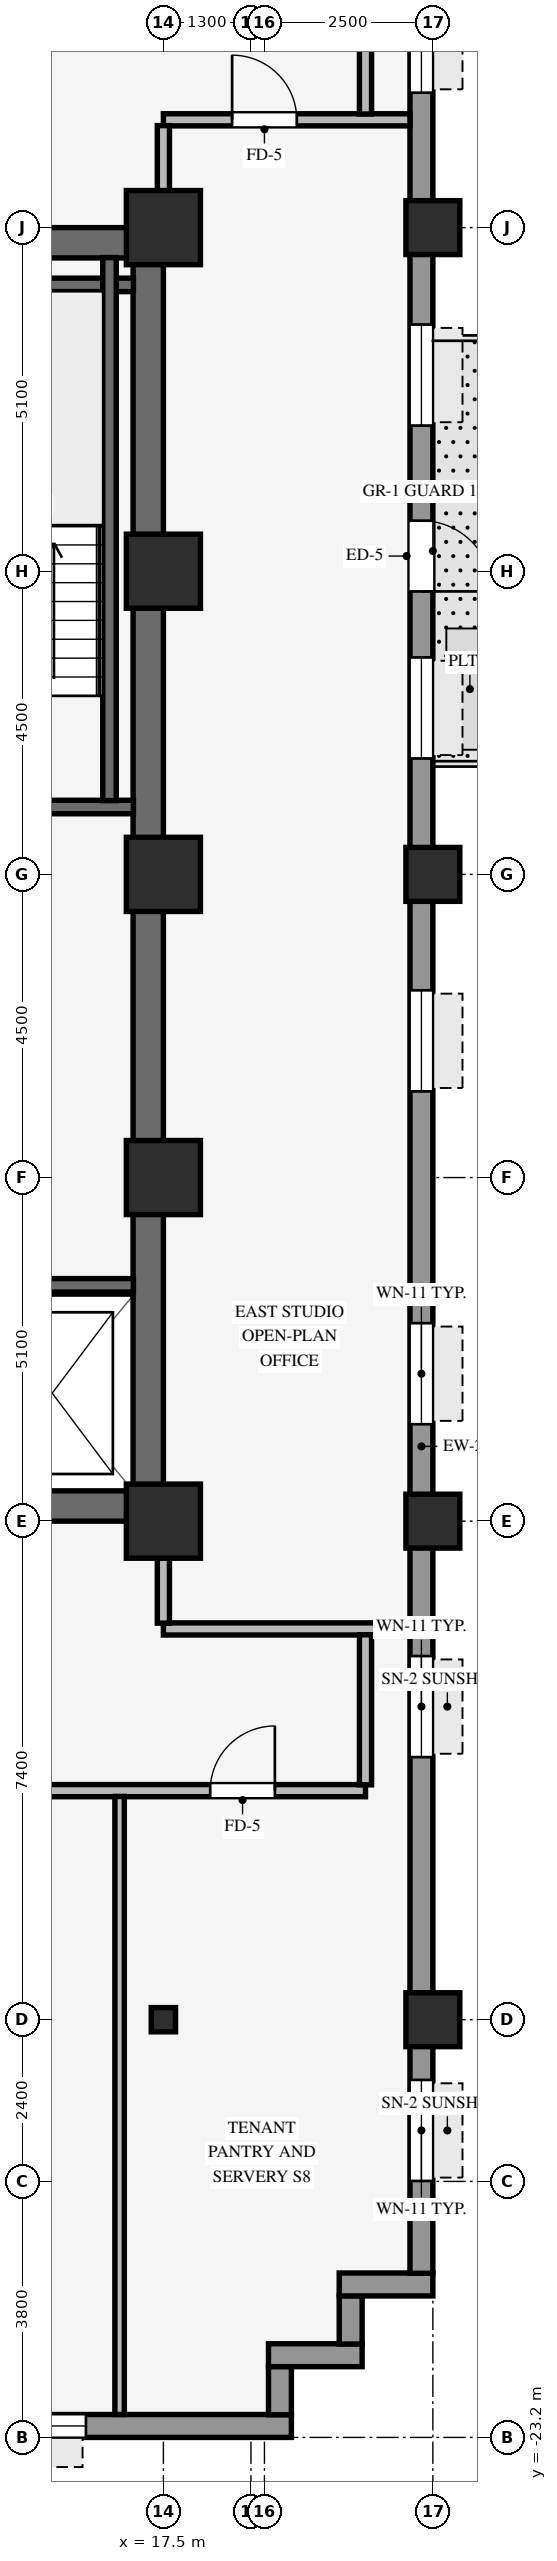
"""IFC4 building model, lengths in metres.
Left out: names, types, materials, properties, quantities, classifications, styles, units other than length and angle.
Written with IfcOpenShell. Run it as: python <this file> out.ifc"""

import sys

from ifc_helpers import new_model, si_unit, direction, frame, frame_2d, origin, origin_2d, place, context, subcontext, project, spatial, rectangle, hollow_rectangle, i_section, extrude, source, transform, mapped, element, fill, save


model = new_model("IFC4")
c1 = context("Model", 3, precision=1e-05, world=origin(), true_north=direction((0.0, 1.0)))
c2 = subcontext(c1, "Body", "Model", "MODEL_VIEW")
j1 = project(units=[si_unit("LENGTHUNIT", "METRE"), si_unit("PLANEANGLEUNIT", "RADIAN")], contexts=[c1])
p1 = place(None, origin())
s1 = spatial("IfcSite", under=j1, at=p1, CompositionType="ELEMENT")
p2 = place(p1, origin())
s2 = spatial("IfcBuilding", under=s1, at=p2, CompositionType="ELEMENT")
p3 = place(p2, frame((0.0, 0.0, 71.4)))
s3 = spatial("IfcBuildingStorey", under=s2, at=p3, CompositionType="ELEMENT", Elevation=71.4)
for number, where, z_axis, x_axis in (
    (1, (9.0, -9.375, 0.0), (0.0, 0.0, 1.0), (1.0, 0.0, 0.0)),
    (2, (9.0, 9.375, 0.0), (0.0, 0.0, 1.0), (1.0, 0.0, 0.0)),
):
    element("IfcWall", number, at=place(p3, frame(where, z_axis=z_axis, x_axis=x_axis)), inside=s3, PredefinedType="SHEAR", context=c2, shape_type="SweptSolid", body=[
        extrude(rectangle(XDim=8.5, YDim=0.45, at=frame_2d((4.25, 0.0))), origin(), (0.0, 0.0, 1.0), 3.37),
    ])
p4 = place(p3, frame((17.275, -9.155, 0.0), z_axis=(0.0, 0.0, 1.0), x_axis=(0.0, 1.0, 0.0)))
e3 = element("IfcWall", 3, at=p4, inside=s3, PredefinedType="SHEAR", context=c2, shape_type="SweptSolid", body=[
    extrude(rectangle(XDim=18.31, YDim=0.45, at=frame_2d((9.155, 0.0))), origin(), (0.0, 0.0, 1.0), 3.37),
])
for number, where, z_axis, x_axis in (
    (4, (17.5, -9.6, 0.0), (0.0, 0.0, 1.0), (1.0, 0.0, 0.0)),
    (5, (17.5, -4.5, 0.0), (0.0, 0.0, 1.0), (1.0, 0.0, 0.0)),
    (6, (17.5, 4.5, 0.0), (0.0, 0.0, 1.0), (1.0, 0.0, 0.0)),
    (7, (17.5, 9.6, 0.0), (0.0, 0.0, 1.0), (1.0, 0.0, 0.0)),
    (8, (17.5, 0.0, 0.0), (0.0, 0.0, 1.0), (1.0, 0.0, 0.0)),
):
    element("IfcColumn", number, at=place(p3, frame(where, z_axis=z_axis, x_axis=x_axis)), inside=s3, PredefinedType="COLUMN", context=c2, shape_type="SweptSolid", body=[
        extrude(rectangle(XDim=1.1, YDim=1.1, at=origin_2d()), origin(), (0.0, 0.0, 1.0), 3.37),
    ])
for number, where, z_axis, x_axis in (
    (9, (21.5, -17.0, 0.0), (0.0, 0.0, 1.0), (1.0, 0.0, 0.0)),
    (10, (21.5, -9.6, 0.0), (0.0, 0.0, 1.0), (1.0, 0.0, 0.0)),
    (11, (21.5, 0.0, 0.0), (0.0, 0.0, 1.0), (1.0, 0.0, 0.0)),
    (12, (21.5, 9.6, 0.0), (0.0, 0.0, 1.0), (1.0, 0.0, 0.0)),
):
    element("IfcColumn", number, at=place(p3, frame(where, z_axis=z_axis, x_axis=x_axis)), inside=s3, PredefinedType="COLUMN", context=c2, shape_type="SweptSolid", body=[
        extrude(hollow_rectangle(XDim=0.8, YDim=0.8, WallThickness=0.055, InnerFilletRadius=0.055, OuterFilletRadius=0.11, at=origin_2d()), origin(), (0.0, 0.0, 1.0), 3.37),
    ])
p5 = place(p3, frame((17.5, -17.0, 0.0), z_axis=(0.0, 0.0, 1.0), x_axis=(1.0, 0.0, 0.0)))
e13 = element("IfcColumn", 13, at=p5, inside=s3, PredefinedType="COLUMN", context=c2, shape_type="SweptSolid", body=[
    extrude(i_section(OverallWidth=0.36, OverallDepth=0.36, WebThickness=0.021, FlangeThickness=0.021, FilletRadius=0.018, at=origin_2d()), origin(), (0.0, 0.0, 1.0), 3.37),
])
p6 = place(p3, frame((-19.4, -23.03, 0.0), z_axis=(0.0, 0.0, 1.0), x_axis=(1.0, 0.0, 0.0)))
e14 = element("IfcWall", 14, at=p6, inside=s3, PredefinedType="STANDARD", context=c2, shape_type="SweptSolid", body=[
    extrude(rectangle(XDim=38.8, YDim=0.34, at=frame_2d((19.4, 0.0))), origin(), (0.0, 0.0, 1.0), 2.705),
])
p7 = place(p6, frame((2.15, 0.0, 0.8)))
e15 = element("IfcOpeningElement", 15, at=p7, cuts=e14, PredefinedType="OPENING", context=c2, shape_type="SweptSolid", body=[
    extrude(rectangle(XDim=2.3, YDim=1.62, at=frame_2d((1.15, 0.81))), frame((0.0, 0.18, 0.0), z_axis=(0.0, -1.0, 0.0), x_axis=(1.0, 0.0, 0.0)), (0.0, 0.0, 1.0), 0.36),
])
p8 = place(p6, frame((6.75, 0.0, 0.8)))
e16 = element("IfcOpeningElement", 16, at=p8, cuts=e14, PredefinedType="OPENING", context=c2, shape_type="SweptSolid", body=[
    extrude(rectangle(XDim=2.3, YDim=1.62, at=frame_2d((1.15, 0.81))), frame((0.0, 0.18, 0.0), z_axis=(0.0, -1.0, 0.0), x_axis=(1.0, 0.0, 0.0)), (0.0, 0.0, 1.0), 0.36),
])
p9 = place(p6, frame((11.35, 0.0, 0.8)))
e17 = element("IfcOpeningElement", 17, at=p9, cuts=e14, PredefinedType="OPENING", context=c2, shape_type="SweptSolid", body=[
    extrude(rectangle(XDim=2.3, YDim=1.62, at=frame_2d((1.15, 0.81))), frame((0.0, 0.18, 0.0), z_axis=(0.0, -1.0, 0.0), x_axis=(1.0, 0.0, 0.0)), (0.0, 0.0, 1.0), 0.36),
])
p10 = place(p6, frame((15.95, 0.0, 0.8)))
e18 = element("IfcOpeningElement", 18, at=p10, cuts=e14, PredefinedType="OPENING", context=c2, shape_type="SweptSolid", body=[
    extrude(rectangle(XDim=2.3, YDim=1.62, at=frame_2d((1.15, 0.81))), frame((0.0, 0.18, 0.0), z_axis=(0.0, -1.0, 0.0), x_axis=(1.0, 0.0, 0.0)), (0.0, 0.0, 1.0), 0.36),
])
p11 = place(p6, frame((20.55, 0.0, 0.8)))
e19 = element("IfcOpeningElement", 19, at=p11, cuts=e14, PredefinedType="OPENING", context=c2, shape_type="SweptSolid", body=[
    extrude(rectangle(XDim=2.3, YDim=1.62, at=frame_2d((1.15, 0.81))), frame((0.0, 0.18, 0.0), z_axis=(0.0, -1.0, 0.0), x_axis=(1.0, 0.0, 0.0)), (0.0, 0.0, 1.0), 0.36),
])
p12 = place(p6, frame((25.15, 0.0, 0.8)))
e20 = element("IfcOpeningElement", 20, at=p12, cuts=e14, PredefinedType="OPENING", context=c2, shape_type="SweptSolid", body=[
    extrude(rectangle(XDim=2.3, YDim=1.62, at=frame_2d((1.15, 0.81))), frame((0.0, 0.18, 0.0), z_axis=(0.0, -1.0, 0.0), x_axis=(1.0, 0.0, 0.0)), (0.0, 0.0, 1.0), 0.36),
])
p13 = place(p6, frame((33.45, 0.0, 0.8)))
e21 = element("IfcOpeningElement", 21, at=p13, cuts=e14, PredefinedType="OPENING", context=c2, shape_type="SweptSolid", body=[
    extrude(rectangle(XDim=2.3, YDim=1.62, at=frame_2d((1.15, 0.81))), frame((0.0, 0.18, 0.0), z_axis=(0.0, -1.0, 0.0), x_axis=(1.0, 0.0, 0.0)), (0.0, 0.0, 1.0), 0.36),
])
p14 = place(p3, frame((19.23, -22.864, 0.0), z_axis=(0.0, 0.0, 1.0), x_axis=(0.0, 1.0, 0.0)))
e22 = element("IfcWall", 22, at=p14, inside=s3, PredefinedType="STANDARD", context=c2, shape_type="SweptSolid", body=[
    extrude(rectangle(XDim=0.718, YDim=0.34, at=frame_2d((0.359, 0.0))), origin(), (0.0, 0.0, 1.0), 3.36),
])
p15 = place(p3, frame((19.06, -21.98, 0.0), z_axis=(0.0, 0.0, 1.0), x_axis=(1.0, 0.0, 0.0)))
e23 = element("IfcWall", 23, at=p15, inside=s3, PredefinedType="STANDARD", context=c2, shape_type="SweptSolid", body=[
    extrude(rectangle(XDim=1.39, YDim=0.34, at=frame_2d((0.695, 0.0))), origin(), (0.0, 0.0, 1.0), 3.36),
])
p16 = place(p3, frame((20.28, -21.814, 0.0), z_axis=(0.0, 0.0, 1.0), x_axis=(0.0, 1.0, 0.0)))
e24 = element("IfcWall", 24, at=p16, inside=s3, PredefinedType="STANDARD", context=c2, shape_type="SweptSolid", body=[
    extrude(rectangle(XDim=0.718, YDim=0.34, at=frame_2d((0.359, 0.0))), origin(), (0.0, 0.0, 1.0), 3.36),
])
p17 = place(p3, frame((20.11, -20.93, 0.0), z_axis=(0.0, 0.0, 1.0), x_axis=(1.0, 0.0, 0.0)))
e25 = element("IfcWall", 25, at=p17, inside=s3, PredefinedType="STANDARD", context=c2, shape_type="SweptSolid", body=[
    extrude(rectangle(XDim=1.39, YDim=0.34, at=frame_2d((0.695, 0.0))), origin(), (0.0, 0.0, 1.0), 3.36),
])
p18 = place(p3, frame((21.33, -20.764, 0.0), z_axis=(0.0, 0.0, 1.0), x_axis=(0.0, 1.0, 0.0)))
e26 = element("IfcWall", 26, at=p18, inside=s3, PredefinedType="STANDARD", context=c2, shape_type="SweptSolid", body=[
    extrude(rectangle(XDim=41.528, YDim=0.34, at=frame_2d((20.764, 0.0))), origin(), (0.0, 0.0, 1.0), 2.705),
])
p19 = place(p18, frame((26.014, 0.0, 0.0), z_axis=(0.0, 0.0, 1.0), x_axis=(-1.0, 0.0, 0.0)))
e27 = element("IfcOpeningElement", 27, at=p19, cuts=e26, PredefinedType="OPENING", context=c2, shape_type="SweptSolid", body=[
    extrude(rectangle(XDim=1.05, YDim=2.1, at=frame_2d((0.525, 1.05))), frame((0.0, 0.18, 0.0), z_axis=(0.0, -1.0, 0.0), x_axis=(1.0, 0.0, 0.0)), (0.0, 0.0, 1.0), 0.36),
])
p20 = place(p18, frame((1.371, 0.0, 0.8)))
e28 = element("IfcOpeningElement", 28, at=p20, cuts=e26, PredefinedType="OPENING", context=c2, shape_type="SweptSolid", body=[
    extrude(rectangle(XDim=1.5, YDim=1.6, at=frame_2d((0.75, 0.8))), frame((0.0, 0.18, 0.0), z_axis=(0.0, -1.0, 0.0), x_axis=(1.0, 0.0, 0.0)), (0.0, 0.0, 1.0), 0.36),
])
p21 = place(p18, frame((7.662, 0.0, 0.8)))
e29 = element("IfcOpeningElement", 29, at=p21, cuts=e26, PredefinedType="OPENING", context=c2, shape_type="SweptSolid", body=[
    extrude(rectangle(XDim=1.5, YDim=1.6, at=frame_2d((0.75, 0.8))), frame((0.0, 0.18, 0.0), z_axis=(0.0, -1.0, 0.0), x_axis=(1.0, 0.0, 0.0)), (0.0, 0.0, 1.0), 0.36),
])
p22 = place(p18, frame((12.603, 0.0, 0.8)))
e30 = element("IfcOpeningElement", 30, at=p22, cuts=e26, PredefinedType="OPENING", context=c2, shape_type="SweptSolid", body=[
    extrude(rectangle(XDim=1.5, YDim=1.6, at=frame_2d((0.75, 0.8))), frame((0.0, 0.18, 0.0), z_axis=(0.0, -1.0, 0.0), x_axis=(1.0, 0.0, 0.0)), (0.0, 0.0, 1.0), 0.36),
])
p23 = place(p18, frame((17.543, 0.0, 0.8)))
e31 = element("IfcOpeningElement", 31, at=p23, cuts=e26, PredefinedType="OPENING", context=c2, shape_type="SweptSolid", body=[
    extrude(rectangle(XDim=1.5, YDim=1.6, at=frame_2d((0.75, 0.8))), frame((0.0, 0.18, 0.0), z_axis=(0.0, -1.0, 0.0), x_axis=(1.0, 0.0, 0.0)), (0.0, 0.0, 1.0), 0.36),
])
p24 = place(p18, frame((22.485, 0.0, 0.8)))
e32 = element("IfcOpeningElement", 32, at=p24, cuts=e26, PredefinedType="OPENING", context=c2, shape_type="SweptSolid", body=[
    extrude(rectangle(XDim=1.5, YDim=1.6, at=frame_2d((0.75, 0.8))), frame((0.0, 0.18, 0.0), z_axis=(0.0, -1.0, 0.0), x_axis=(1.0, 0.0, 0.0)), (0.0, 0.0, 1.0), 0.36),
])
p25 = place(p18, frame((27.426, 0.0, 0.8)))
e33 = element("IfcOpeningElement", 33, at=p25, cuts=e26, PredefinedType="OPENING", context=c2, shape_type="SweptSolid", body=[
    extrude(rectangle(XDim=1.5, YDim=1.6, at=frame_2d((0.75, 0.8))), frame((0.0, 0.18, 0.0), z_axis=(0.0, -1.0, 0.0), x_axis=(1.0, 0.0, 0.0)), (0.0, 0.0, 1.0), 0.36),
])
p26 = place(p18, frame((32.366, 0.0, 0.8)))
e34 = element("IfcOpeningElement", 34, at=p26, cuts=e26, PredefinedType="OPENING", context=c2, shape_type="SweptSolid", body=[
    extrude(rectangle(XDim=1.5, YDim=1.6, at=frame_2d((0.75, 0.8))), frame((0.0, 0.18, 0.0), z_axis=(0.0, -1.0, 0.0), x_axis=(1.0, 0.0, 0.0)), (0.0, 0.0, 1.0), 0.36),
])
p27 = place(p18, frame((38.657, 0.0, 0.8)))
e35 = element("IfcOpeningElement", 35, at=p27, cuts=e26, PredefinedType="OPENING", context=c2, shape_type="SweptSolid", body=[
    extrude(rectangle(XDim=1.5, YDim=1.6, at=frame_2d((0.75, 0.8))), frame((0.0, 0.18, 0.0), z_axis=(0.0, -1.0, 0.0), x_axis=(1.0, 0.0, 0.0)), (0.0, 0.0, 1.0), 0.36),
])
for number, where, z_axis, x_axis in (
    (36, (13.535, 1.0, 0.0), (0.0, 0.0, 1.0), (1.0, 0.0, 0.0)),
    (37, (13.535, 8.75, 0.0), (0.0, 0.0, 1.0), (1.0, 0.0, 0.0)),
):
    element("IfcWall", number, at=place(p3, frame(where, z_axis=z_axis, x_axis=x_axis)), inside=s3, PredefinedType="SHEAR", context=c2, shape_type="SweptSolid", body=[
        extrude(rectangle(XDim=3.52, YDim=0.2, at=frame_2d((1.76, 0.0))), origin(), (0.0, 0.0, 1.0), 3.37),
    ])
p28 = place(p3, frame((16.7, 1.095, 0.0), z_axis=(0.0, 0.0, 1.0), x_axis=(0.0, 1.0, 0.0)))
e38 = element("IfcWall", 38, at=p28, inside=s3, PredefinedType="SHEAR", context=c2, shape_type="SweptSolid", body=[
    extrude(rectangle(XDim=8.06, YDim=0.2, at=frame_2d((4.03, 0.0))), origin(), (0.0, 0.0, 1.0), 3.37),
])
p29 = place(p3, frame((14.645, -6.1, 0.0), z_axis=(0.0, 0.0, 1.0), x_axis=(1.0, 0.0, 0.0)))
e39 = element("IfcWall", 39, at=p29, inside=s3, PredefinedType="SHEAR", context=c2, shape_type="SweptSolid", body=[
    extrude(rectangle(XDim=2.41, YDim=0.2, at=frame_2d((1.205, 0.0))), origin(), (0.0, 0.0, 1.0), 3.37),
])
p30 = place(p3, frame((15.0, -13.6, 0.0), z_axis=(0.0, 0.0, 1.0), x_axis=(1.0, 0.0, 0.0)))
e40 = element("IfcWall", 40, at=p30, inside=s3, PredefinedType="PARTITIONING", context=c2, shape_type="SweptSolid", body=[
    extrude(rectangle(XDim=5.5, YDim=0.18, at=frame_2d((2.75, 0.0))), origin(), (0.0, 0.0, 1.0), 2.942),
])
p31 = place(p30, frame((3.195, 0.0, 0.0)))
e41 = element("IfcOpeningElement", 41, at=p31, cuts=e40, PredefinedType="OPENING", context=c2, shape_type="SweptSolid", body=[
    extrude(rectangle(XDim=0.96, YDim=2.1, at=frame_2d((0.48, 1.05))), frame((0.0, 0.1, 0.0), z_axis=(0.0, -1.0, 0.0), x_axis=(1.0, 0.0, 0.0)), (0.0, 0.0, 1.0), 0.2),
])
p32 = place(p3, frame((17.5, -11.2, 0.0), z_axis=(0.0, 0.0, 1.0), x_axis=(1.0, 0.0, 0.0)))
e42 = element("IfcWall", 42, at=p32, inside=s3, PredefinedType="PARTITIONING", context=c2, shape_type="SweptSolid", body=[
    extrude(rectangle(XDim=3.66, YDim=0.18, at=frame_2d((1.83, 0.0))), origin(), (0.0, 0.0, 1.0), 3.36),
])
p33 = place(p3, frame((17.5, 11.2, 0.0), z_axis=(0.0, 0.0, 1.0), x_axis=(1.0, 0.0, 0.0)))
e43 = element("IfcWall", 43, at=p33, inside=s3, PredefinedType="PARTITIONING", context=c2, shape_type="SweptSolid", body=[
    extrude(rectangle(XDim=3.66, YDim=0.18, at=frame_2d((1.83, 0.0))), origin(), (0.0, 0.0, 1.0), 3.36),
])
p34 = place(p33, frame((1.02, 0.0, 0.0)))
e44 = element("IfcOpeningElement", 44, at=p34, cuts=e43, PredefinedType="OPENING", context=c2, shape_type="SweptSolid", body=[
    extrude(rectangle(XDim=0.96, YDim=2.1, at=frame_2d((0.48, 1.05))), frame((0.0, 0.1, 0.0), z_axis=(0.0, -1.0, 0.0), x_axis=(1.0, 0.0, 0.0)), (0.0, 0.0, 1.0), 0.2),
])
p35 = place(p3, frame((16.85, -22.86, 0.0), z_axis=(0.0, 0.0, 1.0), x_axis=(0.0, 1.0, 0.0)))
e45 = element("IfcWall", 45, at=p35, inside=s3, PredefinedType="PARTITIONING", context=c2, shape_type="SweptSolid", body=[
    extrude(rectangle(XDim=9.174, YDim=0.14, at=frame_2d((4.587, 0.0))), origin(), (0.0, 0.0, 1.0), 3.36),
])
for number, where, z_axis, x_axis in (
    (46, (17.5, -11.114, 0.0), (0.0, 0.0, 1.0), (0.0, 1.0, 0.0)),
    (47, (17.5, 10.146, 0.0), (0.0, 0.0, 1.0), (0.0, 1.0, 0.0)),
):
    element("IfcWall", number, at=place(p3, frame(where, z_axis=z_axis, x_axis=x_axis)), inside=s3, PredefinedType="PARTITIONING", context=c2, shape_type="SweptSolid", body=[
        extrude(rectangle(XDim=0.968, YDim=0.18, at=frame_2d((0.484, 0.0))), origin(), (0.0, 0.0, 1.0), 2.738),
    ])
for number, where, z_axis, x_axis in (
    (48, (20.5, -13.514, 0.0), (0.0, 0.0, 1.0), (0.0, 1.0, 0.0)),
    (49, (20.5, 11.286, 0.0), (0.0, 0.0, 1.0), (0.0, 1.0, 0.0)),
):
    element("IfcWall", number, at=place(p3, frame(where, z_axis=z_axis, x_axis=x_axis)), inside=s3, PredefinedType="PARTITIONING", context=c2, shape_type="SweptSolid", body=[
        extrude(rectangle(XDim=2.228, YDim=0.18, at=frame_2d((1.114, 0.0))), origin(), (0.0, 0.0, 1.0), 3.36),
    ])
m1 = source(origin(), c2, "Body", "SweptSolid", [
    extrude(rectangle(XDim=2.3, YDim=1.62, at=frame_2d((1.15, 0.81))), frame((0.0, 0.03, 0.0), z_axis=(0.0, -1.0, 0.0), x_axis=(1.0, 0.0, 0.0)), (0.0, 0.0, 1.0), 0.06),
])
p36 = place(p13, origin())
e50 = element("IfcWindow", 50, at=p36, inside=s3, PartitioningType="SINGLE_PANEL", PredefinedType="WINDOW", context=c2, shape_type="MappedRepresentation", body=[
    mapped(m1, transform((0.0, 0.0, 0.0), scale=1.0)),
])
fill(e21, e50)
m2 = source(origin(), c2, "Body", "SweptSolid", [
    extrude(rectangle(XDim=1.05, YDim=2.1, at=frame_2d((0.525, 1.05))), frame((0.0, 0.025, 0.0), z_axis=(0.0, -1.0, 0.0), x_axis=(1.0, 0.0, 0.0)), (0.0, 0.0, 1.0), 0.05),
])
p37 = place(p19, origin())
e51 = element("IfcDoor", 51, at=p37, inside=s3, OperationType="SINGLE_SWING_RIGHT", PredefinedType="DOOR", context=c2, shape_type="MappedRepresentation", body=[
    mapped(m2, transform((0.0, 0.0, 0.0), scale=1.0)),
])
fill(e27, e51)
m3 = source(origin(), c2, "Body", "SweptSolid", [
    extrude(rectangle(XDim=1.5, YDim=1.6, at=frame_2d((0.75, 0.8))), frame((0.0, 0.03, 0.0), z_axis=(0.0, -1.0, 0.0), x_axis=(1.0, 0.0, 0.0)), (0.0, 0.0, 1.0), 0.06),
])
p38 = place(p20, origin())
e52 = element("IfcWindow", 52, at=p38, inside=s3, PartitioningType="SINGLE_PANEL", PredefinedType="WINDOW", context=c2, shape_type="MappedRepresentation", body=[
    mapped(m3, transform((0.0, 0.0, 0.0), scale=1.0)),
])
fill(e28, e52)
p39 = place(p21, origin())
e53 = element("IfcWindow", 53, at=p39, inside=s3, PartitioningType="SINGLE_PANEL", PredefinedType="WINDOW", context=c2, shape_type="MappedRepresentation", body=[
    mapped(m3, transform((0.0, 0.0, 0.0), scale=1.0)),
])
fill(e29, e53)
p40 = place(p22, origin())
e54 = element("IfcWindow", 54, at=p40, inside=s3, PartitioningType="SINGLE_PANEL", PredefinedType="WINDOW", context=c2, shape_type="MappedRepresentation", body=[
    mapped(m3, transform((0.0, 0.0, 0.0), scale=1.0)),
])
fill(e30, e54)
p41 = place(p23, origin())
e55 = element("IfcWindow", 55, at=p41, inside=s3, PartitioningType="SINGLE_PANEL", PredefinedType="WINDOW", context=c2, shape_type="MappedRepresentation", body=[
    mapped(m3, transform((0.0, 0.0, 0.0), scale=1.0)),
])
fill(e31, e55)
p42 = place(p24, origin())
e56 = element("IfcWindow", 56, at=p42, inside=s3, PartitioningType="SINGLE_PANEL", PredefinedType="WINDOW", context=c2, shape_type="MappedRepresentation", body=[
    mapped(m3, transform((0.0, 0.0, 0.0), scale=1.0)),
])
fill(e32, e56)
p43 = place(p25, origin())
e57 = element("IfcWindow", 57, at=p43, inside=s3, PartitioningType="SINGLE_PANEL", PredefinedType="WINDOW", context=c2, shape_type="MappedRepresentation", body=[
    mapped(m3, transform((0.0, 0.0, 0.0), scale=1.0)),
])
fill(e33, e57)
p44 = place(p26, origin())
e58 = element("IfcWindow", 58, at=p44, inside=s3, PartitioningType="SINGLE_PANEL", PredefinedType="WINDOW", context=c2, shape_type="MappedRepresentation", body=[
    mapped(m3, transform((0.0, 0.0, 0.0), scale=1.0)),
])
fill(e34, e58)
m4 = source(origin(), c2, "Body", "SweptSolid", [
    extrude(rectangle(XDim=0.96, YDim=2.1, at=frame_2d((0.48, 1.05))), frame((0.0, 0.025, 0.0), z_axis=(0.0, -1.0, 0.0), x_axis=(1.0, 0.0, 0.0)), (0.0, 0.0, 1.0), 0.05),
])
p45 = place(p31, origin())
e59 = element("IfcDoor", 59, at=p45, inside=s3, OperationType="SINGLE_SWING_RIGHT", PredefinedType="DOOR", context=c2, shape_type="MappedRepresentation", body=[
    mapped(m4, transform((0.0, 0.0, 0.0), scale=1.0)),
])
fill(e41, e59)
p46 = place(p34, origin())
e60 = element("IfcDoor", 60, at=p46, inside=s3, OperationType="SINGLE_SWING_LEFT", PredefinedType="DOOR", context=c2, shape_type="MappedRepresentation", body=[
    mapped(m4, transform((0.0, 0.0, 0.0), scale=1.0)),
])
fill(e44, e60)
save(model, sys.argv[1])
